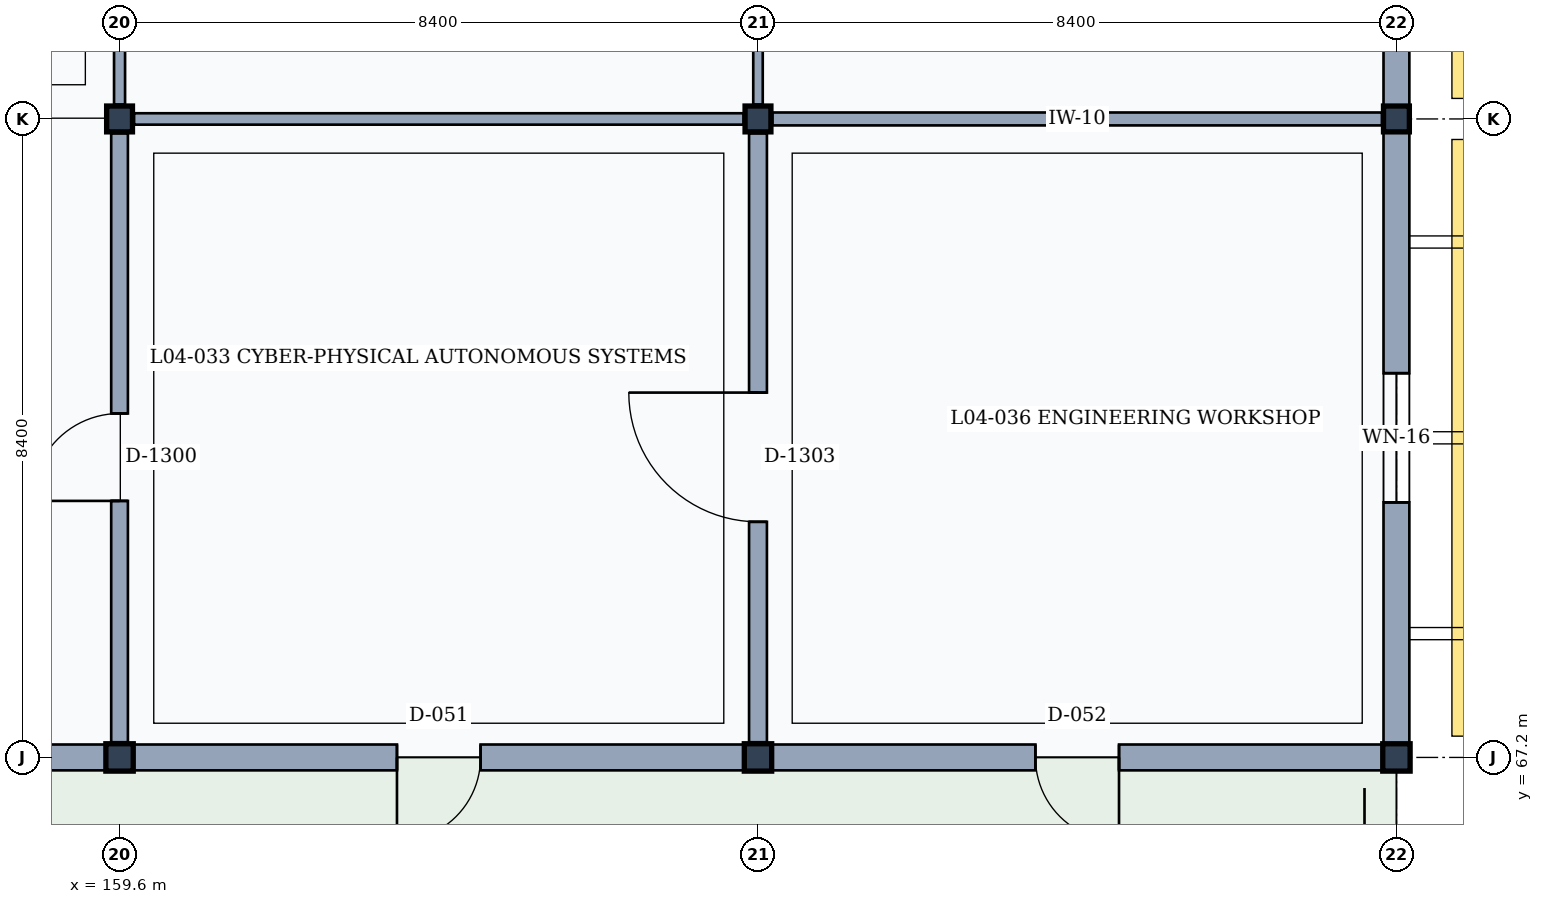
"""IFC4 building model, lengths in metres.
Left out: names, types, materials, properties, quantities, classifications, styles, units other than length and angle.
Written with IfcOpenShell. Run it as: python <this file> out.ifc"""

import sys

from ifc_helpers import new_model, si_unit, direction, frame, frame_2d, origin, origin_2d, place, context, subcontext, project, spatial, rectangle, extrude, element, fill, save


model = new_model("IFC4")
c1 = context("Model", 3, precision=1e-05, world=origin(), true_north=direction((0.0, 1.0)))
c2 = subcontext(c1, "Body", "Model", "MODEL_VIEW")
j1 = project(units=[si_unit("LENGTHUNIT", "METRE"), si_unit("PLANEANGLEUNIT", "RADIAN")], contexts=[c1])
p1 = place(None, origin())
s1 = spatial("IfcSite", under=j1, at=p1, CompositionType="ELEMENT")
p2 = place(p1, origin())
s2 = spatial("IfcBuilding", under=s1, at=p2, CompositionType="ELEMENT")
p3 = place(p2, frame((0.0, 0.0, 18.0)))
s3 = spatial("IfcBuildingStorey", under=s2, at=p3, CompositionType="ELEMENT", Elevation=18.0)
p4 = place(p3, frame((159.6, 67.2, 0.0), z_axis=(0.0, 0.0, 1.0), x_axis=(1.0, 0.0, 0.0)))
e1 = element("IfcColumn", 1, at=p4, inside=s3, PredefinedType="COLUMN", context=c2, shape_type="SweptSolid", body=[
    extrude(rectangle(XDim=0.36, YDim=0.36, at=origin_2d()), origin(), (0.0, 0.0, 1.0), 4.2),
])
p5 = place(p3, frame((159.6, 75.6, 0.0), z_axis=(0.0, 0.0, 1.0), x_axis=(1.0, 0.0, 0.0)))
e2 = element("IfcColumn", 2, at=p5, inside=s3, PredefinedType="COLUMN", context=c2, shape_type="SweptSolid", body=[
    extrude(rectangle(XDim=0.34, YDim=0.34, at=origin_2d()), origin(), (0.0, 0.0, 1.0), 4.2),
])
p6 = place(p3, frame((168.0, 67.2, 0.0), z_axis=(0.0, 0.0, 1.0), x_axis=(1.0, 0.0, 0.0)))
e3 = element("IfcColumn", 3, at=p6, inside=s3, PredefinedType="COLUMN", context=c2, shape_type="SweptSolid", body=[
    extrude(rectangle(XDim=0.36, YDim=0.36, at=origin_2d()), origin(), (0.0, 0.0, 1.0), 4.2),
])
p7 = place(p3, frame((168.0, 75.6, 0.0), z_axis=(0.0, 0.0, 1.0), x_axis=(1.0, 0.0, 0.0)))
e4 = element("IfcColumn", 4, at=p7, inside=s3, PredefinedType="COLUMN", context=c2, shape_type="SweptSolid", body=[
    extrude(rectangle(XDim=0.34, YDim=0.34, at=origin_2d()), origin(), (0.0, 0.0, 1.0), 4.2),
])
p8 = place(p3, frame((176.4, 67.2, 0.0), z_axis=(0.0, 0.0, 1.0), x_axis=(1.0, 0.0, 0.0)))
e5 = element("IfcColumn", 5, at=p8, inside=s3, PredefinedType="COLUMN", context=c2, shape_type="SweptSolid", body=[
    extrude(rectangle(XDim=0.36, YDim=0.36, at=origin_2d()), origin(), (0.0, 0.0, 1.0), 4.2),
])
p9 = place(p3, frame((176.4, 75.6, 0.0), z_axis=(0.0, 0.0, 1.0), x_axis=(1.0, 0.0, 0.0)))
e6 = element("IfcColumn", 6, at=p9, inside=s3, PredefinedType="COLUMN", context=c2, shape_type="SweptSolid", body=[
    extrude(rectangle(XDim=0.34, YDim=0.34, at=origin_2d()), origin(), (0.0, 0.0, 1.0), 4.2),
])
p10 = place(p3, frame((159.42, 67.2, 0.0), z_axis=(0.0, 0.0, 1.0), x_axis=(-1.0, 0.0, 0.0)))
e7 = element("IfcWall", 7, at=p10, inside=s3, PredefinedType="SOLIDWALL", context=c2, shape_type="SweptSolid", body=[
    extrude(rectangle(XDim=8.04, YDim=0.34, at=frame_2d((4.02, 0.0))), origin(), (0.0, 0.0, 1.0), 3.36),
])
p11 = place(p10, frame((3.47, 0.0, 0.0)))
e8 = element("IfcOpeningElement", 8, at=p11, cuts=e7, PredefinedType="OPENING", context=c2, shape_type="SweptSolid", body=[
    extrude(rectangle(XDim=1.1, YDim=2.2, at=frame_2d((0.55, 1.1))), frame((0.0, 0.18, 0.0), z_axis=(0.0, -1.0, 0.0), x_axis=(1.0, 0.0, 0.0)), (0.0, 0.0, 1.0), 0.36),
])
p12 = place(p3, frame((167.82, 67.2, 0.0), z_axis=(0.0, 0.0, 1.0), x_axis=(-1.0, 0.0, 0.0)))
e9 = element("IfcWall", 9, at=p12, inside=s3, PredefinedType="SOLIDWALL", context=c2, shape_type="SweptSolid", body=[
    extrude(rectangle(XDim=8.04, YDim=0.34, at=frame_2d((4.02, 0.0))), origin(), (0.0, 0.0, 1.0), 3.36),
])
p13 = place(p12, frame((3.47, 0.0, 0.0)))
e10 = element("IfcOpeningElement", 10, at=p13, cuts=e9, PredefinedType="OPENING", context=c2, shape_type="SweptSolid", body=[
    extrude(rectangle(XDim=1.1, YDim=2.2, at=frame_2d((0.55, 1.1))), frame((0.0, 0.18, 0.0), z_axis=(0.0, -1.0, 0.0), x_axis=(1.0, 0.0, 0.0)), (0.0, 0.0, 1.0), 0.36),
])
p14 = place(p3, frame((176.22, 67.2, 0.0), z_axis=(0.0, 0.0, 1.0), x_axis=(-1.0, 0.0, 0.0)))
e11 = element("IfcWall", 11, at=p14, inside=s3, PredefinedType="SOLIDWALL", context=c2, shape_type="SweptSolid", body=[
    extrude(rectangle(XDim=8.04, YDim=0.34, at=frame_2d((4.02, 0.0))), origin(), (0.0, 0.0, 1.0), 3.36),
])
p15 = place(p14, frame((3.47, 0.0, 0.0)))
e12 = element("IfcOpeningElement", 12, at=p15, cuts=e11, PredefinedType="OPENING", context=c2, shape_type="SweptSolid", body=[
    extrude(rectangle(XDim=1.1, YDim=2.2, at=frame_2d((0.55, 1.1))), frame((0.0, 0.18, 0.0), z_axis=(0.0, -1.0, 0.0), x_axis=(1.0, 0.0, 0.0)), (0.0, 0.0, 1.0), 0.36),
])
p16 = place(p3, frame((176.4, 75.43, 0.0), z_axis=(0.0, 0.0, 1.0), x_axis=(0.0, -1.0, 0.0)))
e13 = element("IfcWall", 13, at=p16, inside=s3, PredefinedType="SOLIDWALL", context=c2, shape_type="SweptSolid", body=[
    extrude(rectangle(XDim=8.05, YDim=0.34, at=frame_2d((4.025, 0.0))), origin(), (0.0, 0.0, 1.0), 3.36),
])
p17 = place(p16, frame((3.175, 0.0, 0.9)))
e14 = element("IfcOpeningElement", 14, at=p17, cuts=e13, PredefinedType="OPENING", context=c2, shape_type="SweptSolid", body=[
    extrude(rectangle(XDim=1.7, YDim=1.55, at=frame_2d((0.85, 0.775))), frame((0.0, 0.18, 0.0), z_axis=(0.0, -1.0, 0.0), x_axis=(1.0, 0.0, 0.0)), (0.0, 0.0, 1.0), 0.36),
])
p18 = place(p3, frame((176.4, 83.82, 0.0), z_axis=(0.0, 0.0, 1.0), x_axis=(0.0, -1.0, 0.0)))
e15 = element("IfcWall", 15, at=p18, inside=s3, PredefinedType="SOLIDWALL", context=c2, shape_type="SweptSolid", body=[
    extrude(rectangle(XDim=8.05, YDim=0.34, at=frame_2d((4.025, 0.0))), origin(), (0.0, 0.0, 1.0), 3.36),
])
p19 = place(p18, frame((2.875, 0.0, 0.9)))
e16 = element("IfcOpeningElement", 16, at=p19, cuts=e15, PredefinedType="OPENING", context=c2, shape_type="SweptSolid", body=[
    extrude(rectangle(XDim=2.3, YDim=1.5, at=frame_2d((1.15, 0.75))), frame((0.0, 0.18, 0.0), z_axis=(0.0, -1.0, 0.0), x_axis=(1.0, 0.0, 0.0)), (0.0, 0.0, 1.0), 0.36),
])
p20 = place(p3, frame((159.6, 67.4, 0.0), z_axis=(0.0, 0.0, 1.0), x_axis=(0.0, 1.0, 0.0)))
e17 = element("IfcWall", 17, at=p20, inside=s3, PredefinedType="PARTITIONING", context=c2, shape_type="SweptSolid", body=[
    extrude(rectangle(XDim=8.01, YDim=0.22, at=frame_2d((4.005, 0.0))), origin(), (0.0, 0.0, 1.0), 3.32),
])
p21 = place(p20, frame((3.175, 0.0, 0.0)))
e18 = element("IfcOpeningElement", 18, at=p21, cuts=e17, PredefinedType="OPENING", context=c2, shape_type="SweptSolid", body=[
    extrude(rectangle(XDim=1.15, YDim=2.25, at=frame_2d((0.575, 1.125))), frame((0.0, 0.12, 0.0), z_axis=(0.0, -1.0, 0.0), x_axis=(1.0, 0.0, 0.0)), (0.0, 0.0, 1.0), 0.24),
])
p22 = place(p3, frame((159.6, 75.79, 0.0), z_axis=(0.0, 0.0, 1.0), x_axis=(0.0, 1.0, 0.0)))
e19 = element("IfcWall", 19, at=p22, inside=s3, PredefinedType="PARTITIONING", context=c2, shape_type="SweptSolid", body=[
    extrude(rectangle(XDim=8.01, YDim=0.145, at=frame_2d((4.005, 0.0))), origin(), (0.0, 0.0, 1.0), 3.32),
])
p23 = place(p22, frame((3.1, 0.0, 0.0)))
e20 = element("IfcOpeningElement", 20, at=p23, cuts=e19, PredefinedType="OPENING", context=c2, shape_type="SweptSolid", body=[
    extrude(rectangle(XDim=1.3, YDim=2.2, at=frame_2d((0.65, 1.1))), frame((0.0, 0.083, 0.0), z_axis=(0.0, -1.0, 0.0), x_axis=(1.0, 0.0, 0.0)), (0.0, 0.0, 1.0), 0.165),
])
p24 = place(p3, frame((168.0, 67.4, 0.0), z_axis=(0.0, 0.0, 1.0), x_axis=(0.0, 1.0, 0.0)))
e21 = element("IfcWall", 21, at=p24, inside=s3, PredefinedType="PARTITIONING", context=c2, shape_type="SweptSolid", body=[
    extrude(rectangle(XDim=8.01, YDim=0.235, at=frame_2d((4.005, 0.0))), origin(), (0.0, 0.0, 1.0), 3.32),
])
p25 = place(p24, frame((2.9, 0.0, 0.0)))
e22 = element("IfcOpeningElement", 22, at=p25, cuts=e21, PredefinedType="OPENING", context=c2, shape_type="SweptSolid", body=[
    extrude(rectangle(XDim=1.7, YDim=2.3, at=frame_2d((0.85, 1.15))), frame((0.0, 0.127, 0.0), z_axis=(0.0, -1.0, 0.0), x_axis=(1.0, 0.0, 0.0)), (0.0, 0.0, 1.0), 0.255),
])
p26 = place(p3, frame((159.79, 75.6, 0.0), z_axis=(0.0, 0.0, 1.0), x_axis=(1.0, 0.0, 0.0)))
e23 = element("IfcWall", 23, at=p26, inside=s3, PredefinedType="PARTITIONING", context=c2, shape_type="SweptSolid", body=[
    extrude(rectangle(XDim=8.02, YDim=0.15, at=frame_2d((4.01, 0.0))), origin(), (0.0, 0.0, 1.0), 3.32),
])
p27 = place(p3, frame((168.0, 75.79, 0.0), z_axis=(0.0, 0.0, 1.0), x_axis=(0.0, 1.0, 0.0)))
e24 = element("IfcWall", 24, at=p27, inside=s3, PredefinedType="PARTITIONING", context=c2, shape_type="SweptSolid", body=[
    extrude(rectangle(XDim=8.01, YDim=0.125, at=frame_2d((4.005, 0.0))), origin(), (0.0, 0.0, 1.0), 3.32),
])
p28 = place(p27, frame((2.8, 0.0, 0.0)))
e25 = element("IfcOpeningElement", 25, at=p28, cuts=e24, PredefinedType="OPENING", context=c2, shape_type="SweptSolid", body=[
    extrude(rectangle(XDim=1.9, YDim=2.4, at=frame_2d((0.95, 1.2))), frame((0.0, 0.073, 0.0), z_axis=(0.0, -1.0, 0.0), x_axis=(1.0, 0.0, 0.0)), (0.0, 0.0, 1.0), 0.145),
])
p29 = place(p3, frame((168.19, 75.6, 0.0), z_axis=(0.0, 0.0, 1.0), x_axis=(1.0, 0.0, 0.0)))
e26 = element("IfcWall", 26, at=p29, inside=s3, PredefinedType="PARTITIONING", context=c2, shape_type="SweptSolid", body=[
    extrude(rectangle(XDim=8.02, YDim=0.17, at=frame_2d((4.01, 0.0))), origin(), (0.0, 0.0, 1.0), 3.32),
])
p30 = place(p13, origin())
e27 = element("IfcDoor", 27, at=p30, inside=s3, OperationType="SINGLE_SWING_RIGHT", PredefinedType="DOOR", context=c2, shape_type="SweptSolid", body=[
    extrude(rectangle(XDim=1.1, YDim=2.2, at=frame_2d((0.55, 1.1))), frame((0.0, 0.025, 0.0), z_axis=(0.0, -1.0, 0.0), x_axis=(1.0, 0.0, 0.0)), (0.0, 0.0, 1.0), 0.05),
])
fill(e10, e27)
p31 = place(p15, origin())
e28 = element("IfcDoor", 28, at=p31, inside=s3, OperationType="SINGLE_SWING_LEFT", PredefinedType="DOOR", context=c2, shape_type="SweptSolid", body=[
    extrude(rectangle(XDim=1.1, YDim=2.2, at=frame_2d((0.55, 1.1))), frame((0.0, 0.025, 0.0), z_axis=(0.0, -1.0, 0.0), x_axis=(1.0, 0.0, 0.0)), (0.0, 0.0, 1.0), 0.05),
])
fill(e12, e28)
p32 = place(p17, origin())
e29 = element("IfcWindow", 29, at=p32, inside=s3, PartitioningType="SINGLE_PANEL", PredefinedType="WINDOW", context=c2, shape_type="SweptSolid", body=[
    extrude(rectangle(XDim=1.7, YDim=1.55, at=frame_2d((0.85, 0.775))), frame((0.0, 0.03, 0.0), z_axis=(0.0, -1.0, 0.0), x_axis=(1.0, 0.0, 0.0)), (0.0, 0.0, 1.0), 0.06),
])
fill(e14, e29)
p33 = place(p21, origin())
e30 = element("IfcDoor", 30, at=p33, inside=s3, OperationType="SINGLE_SWING_LEFT", PredefinedType="DOOR", context=c2, shape_type="SweptSolid", body=[
    extrude(rectangle(XDim=1.15, YDim=2.25, at=frame_2d((0.575, 1.125))), frame((0.0, 0.025, 0.0), z_axis=(0.0, -1.0, 0.0), x_axis=(1.0, 0.0, 0.0)), (0.0, 0.0, 1.0), 0.05),
])
fill(e18, e30)
p34 = place(p25, origin())
e31 = element("IfcDoor", 31, at=p34, inside=s3, OperationType="SINGLE_SWING_RIGHT", PredefinedType="DOOR", context=c2, shape_type="SweptSolid", body=[
    extrude(rectangle(XDim=1.7, YDim=2.3, at=frame_2d((0.85, 1.15))), frame((0.0, 0.025, 0.0), z_axis=(0.0, -1.0, 0.0), x_axis=(1.0, 0.0, 0.0)), (0.0, 0.0, 1.0), 0.05),
])
fill(e22, e31)
save(model, sys.argv[1])
